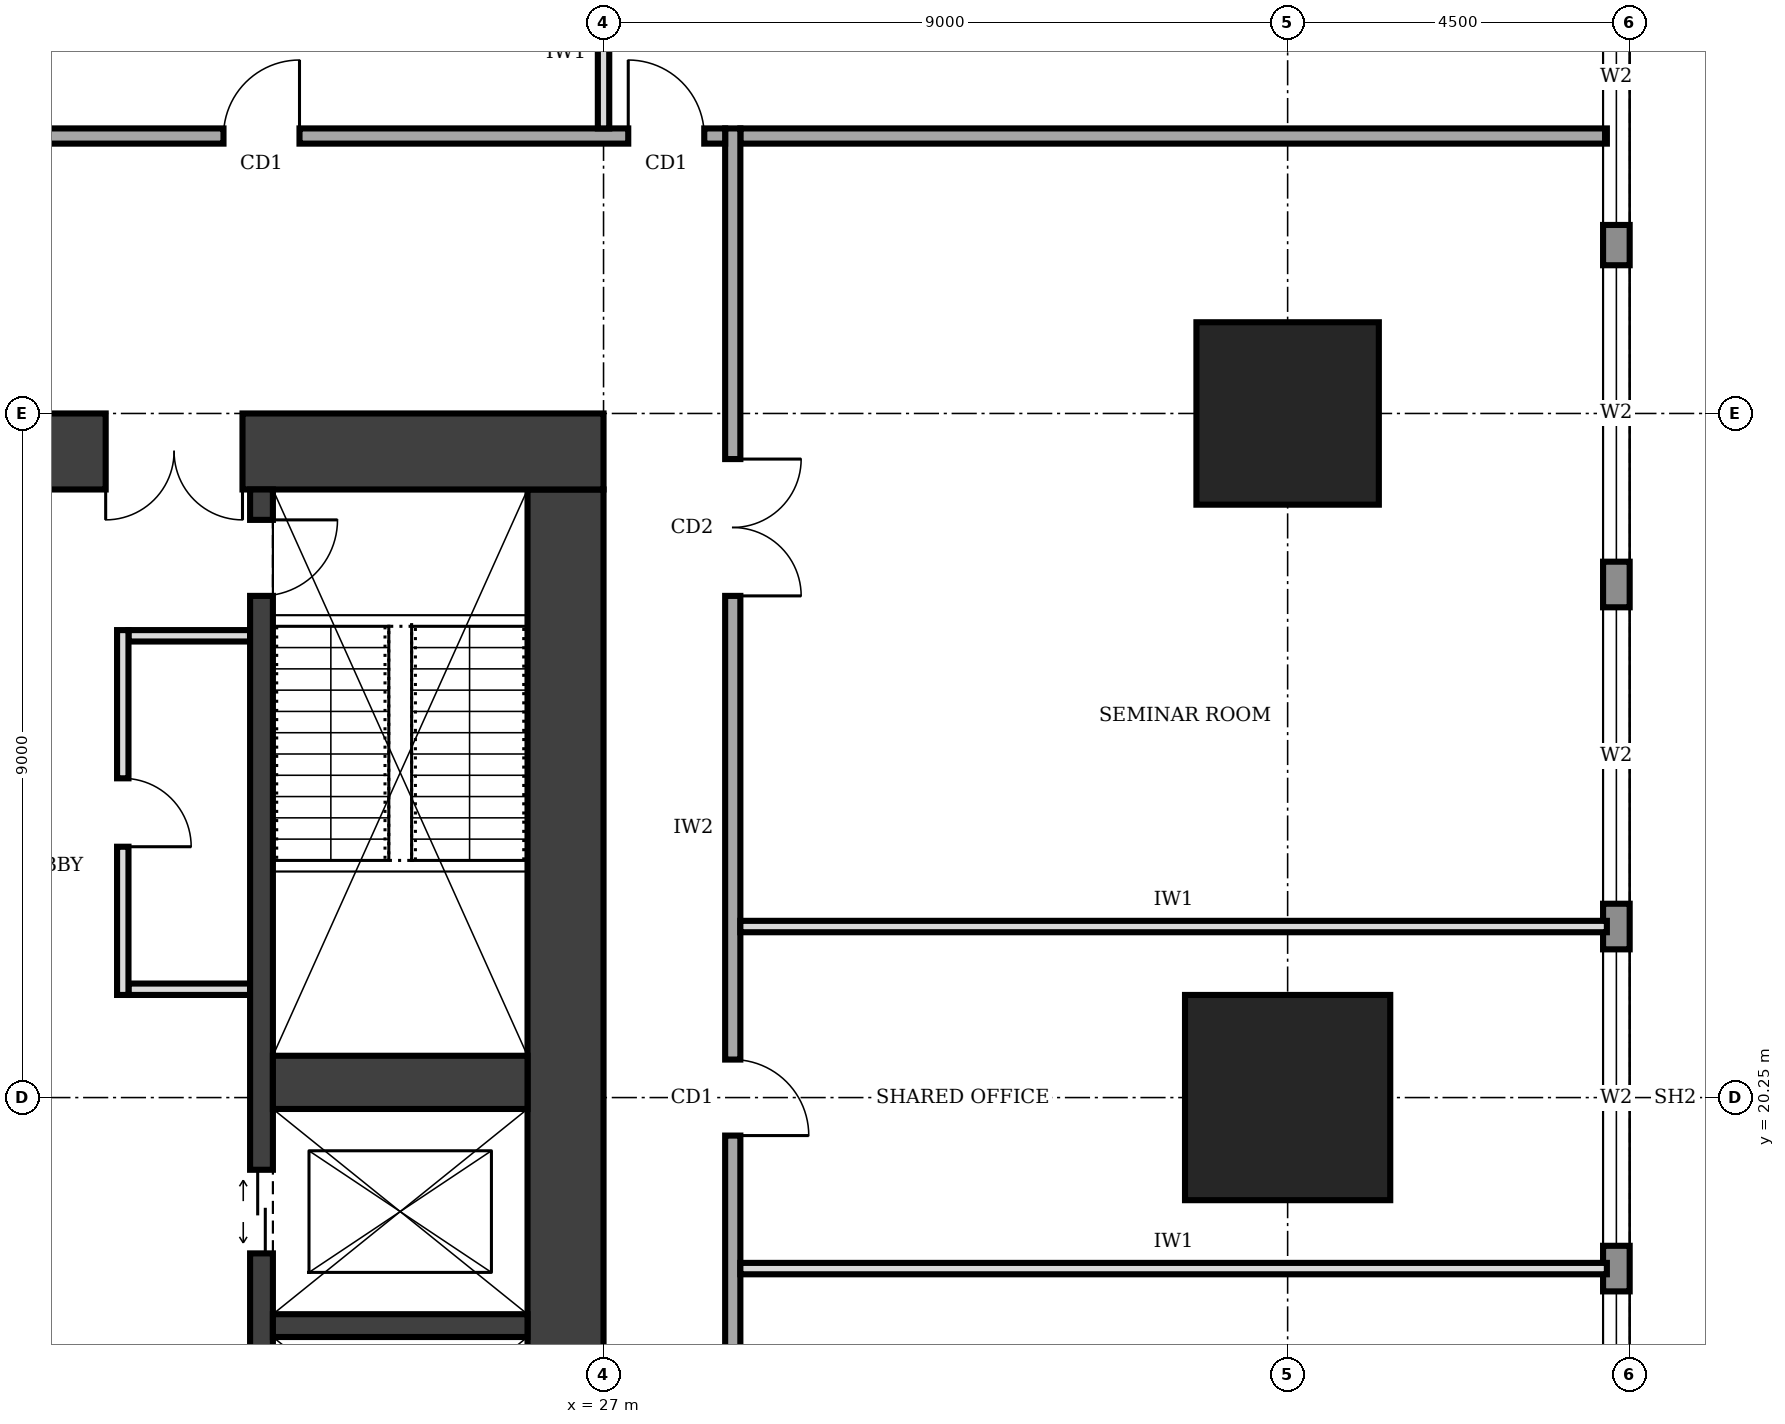
"""IFC4 building model, lengths in metres.
Left out: names, types, materials, properties, quantities, classifications, styles, units other than length and angle.
Written with IfcOpenShell. Run it as: python <this file> out.ifc"""

import sys

from ifc_helpers import new_model, si_unit, direction, frame, frame_2d, origin, origin_2d, place, context, subcontext, project, spatial, rectangle, extrude, element, fill, save


model = new_model("IFC4")
c1 = context("Model", 3, precision=1e-05, world=origin(), true_north=direction((0.0, 1.0)))
c2 = subcontext(c1, "Body", "Model", "MODEL_VIEW")
j1 = project(units=[si_unit("LENGTHUNIT", "METRE"), si_unit("PLANEANGLEUNIT", "RADIAN")], contexts=[c1])
p1 = place(None, origin())
s1 = spatial("IfcSite", under=j1, at=p1, CompositionType="ELEMENT")
p2 = place(p1, origin())
s2 = spatial("IfcBuilding", under=s1, at=p2, CompositionType="ELEMENT")
p3 = place(p2, frame((0.0, 0.0, 57.0)))
s3 = spatial("IfcBuildingStorey", under=s2, at=p3, CompositionType="ELEMENT", Elevation=57.0)
p4 = place(p3, frame((26.5, 12.25, 0.0), z_axis=(0.0, 0.0, 1.0), x_axis=(0.0, 1.0, 0.0)))
e1 = element("IfcWall", 1, at=p4, inside=s3, PredefinedType="SHEAR", context=c2, shape_type="SweptSolid", body=[
    extrude(rectangle(XDim=16.0, YDim=1.0, at=frame_2d((8.0, 0.0))), origin(), (0.0, 0.0, 1.0), 4.0),
])
p5 = place(p3, frame((27.0, 28.75, 0.0), z_axis=(0.0, 0.0, 1.0), x_axis=(-1.0, 0.0, 0.0)))
e2 = element("IfcWall", 2, at=p5, inside=s3, PredefinedType="SHEAR", context=c2, shape_type="SweptSolid", body=[
    extrude(rectangle(XDim=13.5, YDim=1.0, at=frame_2d((6.75, 0.0))), origin(), (0.0, 0.0, 1.0), 4.0),
])
p6 = place(p5, frame((4.75, 0.0, 0.0)))
e3 = element("IfcOpeningElement", 3, at=p6, cuts=e2, PredefinedType="OPENING", context=c2, shape_type="SweptSolid", body=[
    extrude(rectangle(XDim=1.8, YDim=2.1, at=frame_2d((0.9, 1.05))), frame((0.0, 0.51, 0.0), z_axis=(0.0, -1.0, 0.0), x_axis=(1.0, 0.0, 0.0)), (0.0, 0.0, 1.0), 1.02),
])
p7 = place(p3, frame((22.5, 12.25, 0.0), z_axis=(0.0, 0.0, 1.0), x_axis=(0.0, 1.0, 0.0)))
e4 = element("IfcWall", 4, at=p7, inside=s3, PredefinedType="SHEAR", context=c2, shape_type="SweptSolid", body=[
    extrude(rectangle(XDim=16.0, YDim=0.3, at=frame_2d((8.0, 0.0))), origin(), (0.0, 0.0, 1.0), 4.0),
])
p8 = place(p7, frame((14.6, 0.0, 0.0)))
e5 = element("IfcOpeningElement", 5, at=p8, cuts=e4, PredefinedType="OPENING", context=c2, shape_type="SweptSolid", body=[
    extrude(rectangle(XDim=1.0, YDim=2.1, at=frame_2d((0.5, 1.05))), frame((0.0, 0.16, 0.0), z_axis=(0.0, -1.0, 0.0), x_axis=(1.0, 0.0, 0.0)), (0.0, 0.0, 1.0), 0.32),
])
p9 = place(p7, frame((0.375, 0.0, 0.0)))
e6 = element("IfcOpeningElement", 6, at=p9, cuts=e4, PredefinedType="OPENING", context=c2, shape_type="SweptSolid", body=[
    extrude(rectangle(XDim=1.1, YDim=2.1, at=frame_2d((0.55, 1.05))), frame((0.0, 0.16, 0.0), z_axis=(0.0, -1.0, 0.0), x_axis=(1.0, 0.0, 0.0)), (0.0, 0.0, 1.0), 0.32),
])
p10 = place(p7, frame((5.95, 0.0, 0.0)))
e7 = element("IfcOpeningElement", 7, at=p10, cuts=e4, PredefinedType="OPENING", context=c2, shape_type="SweptSolid", body=[
    extrude(rectangle(XDim=1.1, YDim=2.1, at=frame_2d((0.55, 1.05))), frame((0.0, 0.16, 0.0), z_axis=(0.0, -1.0, 0.0), x_axis=(1.0, 0.0, 0.0)), (0.0, 0.0, 1.0), 0.32),
])
p11 = place(p3, frame((22.65, 17.25, 0.0), z_axis=(0.0, 0.0, 1.0), x_axis=(1.0, 0.0, 0.0)))
e8 = element("IfcWall", 8, at=p11, inside=s3, PredefinedType="SHEAR", context=c2, shape_type="SweptSolid", body=[
    extrude(rectangle(XDim=3.35, YDim=0.3, at=frame_2d((1.675, 0.0))), origin(), (0.0, 0.0, 1.0), 4.0),
])
p12 = place(p3, frame((22.65, 20.45, 0.0), z_axis=(0.0, 0.0, 1.0), x_axis=(1.0, 0.0, 0.0)))
e9 = element("IfcWall", 9, at=p12, inside=s3, PredefinedType="SHEAR", context=c2, shape_type="SweptSolid", body=[
    extrude(rectangle(XDim=3.35, YDim=0.7, at=frame_2d((1.675, 0.0))), origin(), (0.0, 0.0, 1.0), 4.0),
])
p13 = place(p3, frame((36.0, 20.25, 0.0), z_axis=(0.0, 0.0, 1.0), x_axis=(1.0, 0.0, 0.0)))
e10 = element("IfcColumn", 10, at=p13, inside=s3, PredefinedType="COLUMN", context=c2, shape_type="SweptSolid", body=[
    extrude(rectangle(XDim=2.7, YDim=2.7, at=origin_2d()), origin(), (0.0, 0.0, 1.0), 4.0),
])
p14 = place(p3, frame((36.0, 29.25, 0.0), z_axis=(0.0, 0.0, 1.0), x_axis=(1.0, 0.0, 0.0)))
e11 = element("IfcColumn", 11, at=p14, inside=s3, PredefinedType="COLUMN", context=c2, shape_type="SweptSolid", body=[
    extrude(rectangle(XDim=2.4, YDim=2.4, at=origin_2d()), origin(), (0.0, 0.0, 1.0), 4.0),
])
p15 = place(p3, frame((40.325, 4.52, 0.0), z_axis=(0.0, 0.0, 1.0), x_axis=(0.0, 1.0, 0.0)))
e12 = element("IfcWall", 12, at=p15, inside=s3, PredefinedType="STANDARD", context=c2, shape_type="SweptSolid", body=[
    extrude(rectangle(XDim=31.46, YDim=0.35, at=frame_2d((15.73, 0.0))), origin(), (0.0, 0.0, 1.0), 3.75),
])
p16 = place(p15, frame((4.78, 0.0, 0.6)))
e13 = element("IfcOpeningElement", 13, at=p16, cuts=e12, PredefinedType="OPENING", context=c2, shape_type="SweptSolid", body=[
    extrude(rectangle(XDim=3.9, YDim=2.6, at=frame_2d((1.95, 1.3))), frame((0.0, 0.185, 0.0), z_axis=(0.0, -1.0, 0.0), x_axis=(1.0, 0.0, 0.0)), (0.0, 0.0, 1.0), 0.37),
])
p17 = place(p15, frame((9.28, 0.0, 0.6)))
e14 = element("IfcOpeningElement", 14, at=p17, cuts=e12, PredefinedType="OPENING", context=c2, shape_type="SweptSolid", body=[
    extrude(rectangle(XDim=3.9, YDim=2.6, at=frame_2d((1.95, 1.3))), frame((0.0, 0.185, 0.0), z_axis=(0.0, -1.0, 0.0), x_axis=(1.0, 0.0, 0.0)), (0.0, 0.0, 1.0), 0.37),
])
p18 = place(p15, frame((13.78, 0.0, 0.6)))
e15 = element("IfcOpeningElement", 15, at=p18, cuts=e12, PredefinedType="OPENING", context=c2, shape_type="SweptSolid", body=[
    extrude(rectangle(XDim=3.9, YDim=2.6, at=frame_2d((1.95, 1.3))), frame((0.0, 0.185, 0.0), z_axis=(0.0, -1.0, 0.0), x_axis=(1.0, 0.0, 0.0)), (0.0, 0.0, 1.0), 0.37),
])
p19 = place(p15, frame((18.28, 0.0, 0.6)))
e16 = element("IfcOpeningElement", 16, at=p19, cuts=e12, PredefinedType="OPENING", context=c2, shape_type="SweptSolid", body=[
    extrude(rectangle(XDim=3.9, YDim=2.6, at=frame_2d((1.95, 1.3))), frame((0.0, 0.185, 0.0), z_axis=(0.0, -1.0, 0.0), x_axis=(1.0, 0.0, 0.0)), (0.0, 0.0, 1.0), 0.37),
])
p20 = place(p15, frame((22.78, 0.0, 0.6)))
e17 = element("IfcOpeningElement", 17, at=p20, cuts=e12, PredefinedType="OPENING", context=c2, shape_type="SweptSolid", body=[
    extrude(rectangle(XDim=3.9, YDim=2.6, at=frame_2d((1.95, 1.3))), frame((0.0, 0.185, 0.0), z_axis=(0.0, -1.0, 0.0), x_axis=(1.0, 0.0, 0.0)), (0.0, 0.0, 1.0), 0.37),
])
p21 = place(p15, frame((27.21, 0.0, 0.6)))
e18 = element("IfcOpeningElement", 18, at=p21, cuts=e12, PredefinedType="OPENING", context=c2, shape_type="SweptSolid", body=[
    extrude(rectangle(XDim=3.9, YDim=2.6, at=frame_2d((1.95, 1.3))), frame((0.0, 0.185, 0.0), z_axis=(0.0, -1.0, 0.0), x_axis=(1.0, 0.0, 0.0)), (0.0, 0.0, 1.0), 0.37),
])
p22 = place(p3, frame((20.675, 21.6, 0.0), z_axis=(0.0, 0.0, 1.0), x_axis=(0.0, 1.0, 0.0)))
e19 = element("IfcWall", 19, at=p22, inside=s3, PredefinedType="PARTITIONING", context=c2, shape_type="SweptSolid", body=[
    extrude(rectangle(XDim=4.8, YDim=0.15, at=frame_2d((2.4, 0.0))), origin(), (0.0, 0.0, 1.0), 3.75),
])
p23 = place(p22, frame((1.95, 0.0, 0.0)))
e20 = element("IfcOpeningElement", 20, at=p23, cuts=e19, PredefinedType="OPENING", context=c2, shape_type="SweptSolid", body=[
    extrude(rectangle(XDim=0.9, YDim=2.1, at=frame_2d((0.45, 1.05))), frame((0.0, 0.085, 0.0), z_axis=(0.0, -1.0, 0.0), x_axis=(1.0, 0.0, 0.0)), (0.0, 0.0, 1.0), 0.17),
])
for number, where, z_axis, x_axis in (
    (21, (20.75, 21.675, 0.0), (0.0, 0.0, 1.0), (1.0, 0.0, 0.0)),
    (22, (20.75, 26.325, 0.0), (0.0, 0.0, 1.0), (1.0, 0.0, 0.0)),
):
    element("IfcWall", number, at=place(p3, frame(where, z_axis=z_axis, x_axis=x_axis)), inside=s3, PredefinedType="PARTITIONING", context=c2, shape_type="SweptSolid", body=[
        extrude(rectangle(XDim=1.6, YDim=0.15, at=frame_2d((0.8, 0.0))), origin(), (0.0, 0.0, 1.0), 3.75),
    ])
p24 = place(p3, frame((28.7, 9.2, 0.0), z_axis=(0.0, 0.0, 1.0), x_axis=(0.0, 1.0, 0.0)))
e23 = element("IfcWall", 23, at=p24, inside=s3, PredefinedType="SOLIDWALL", context=c2, shape_type="SweptSolid", body=[
    extrude(rectangle(XDim=23.8, YDim=0.2, at=frame_2d((11.9, 0.0))), origin(), (0.0, 0.0, 1.0), 3.75),
])
p25 = place(p24, frame((3.4, 0.0, 0.0)))
e24 = element("IfcOpeningElement", 24, at=p25, cuts=e23, PredefinedType="OPENING", context=c2, shape_type="SweptSolid", body=[
    extrude(rectangle(XDim=1.8, YDim=2.1, at=frame_2d((0.9, 1.05))), frame((0.0, 0.11, 0.0), z_axis=(0.0, -1.0, 0.0), x_axis=(1.0, 0.0, 0.0)), (0.0, 0.0, 1.0), 0.22),
])
p26 = place(p24, frame((10.55, 0.0, 0.0)))
e25 = element("IfcOpeningElement", 25, at=p26, cuts=e23, PredefinedType="OPENING", context=c2, shape_type="SweptSolid", body=[
    extrude(rectangle(XDim=1.0, YDim=2.1, at=frame_2d((0.5, 1.05))), frame((0.0, 0.11, 0.0), z_axis=(0.0, -1.0, 0.0), x_axis=(1.0, 0.0, 0.0)), (0.0, 0.0, 1.0), 0.22),
])
p27 = place(p24, frame((17.65, 0.0, 0.0)))
e26 = element("IfcOpeningElement", 26, at=p27, cuts=e23, PredefinedType="OPENING", context=c2, shape_type="SweptSolid", body=[
    extrude(rectangle(XDim=1.8, YDim=2.1, at=frame_2d((0.9, 1.05))), frame((0.0, 0.11, 0.0), z_axis=(0.0, -1.0, 0.0), x_axis=(1.0, 0.0, 0.0)), (0.0, 0.0, 1.0), 0.22),
])
p28 = place(p3, frame((28.6, 32.9, 0.0), z_axis=(0.0, 0.0, 1.0), x_axis=(-1.0, 0.0, 0.0)))
e27 = element("IfcWall", 27, at=p28, inside=s3, PredefinedType="SOLIDWALL", context=c2, shape_type="SweptSolid", body=[
    extrude(rectangle(XDim=16.9, YDim=0.2, at=frame_2d((8.45, 0.0))), origin(), (0.0, 0.0, 1.0), 3.75),
])
p29 = place(p28, frame((15.425, 0.0, 0.0)))
e28 = element("IfcOpeningElement", 28, at=p29, cuts=e27, PredefinedType="OPENING", context=c2, shape_type="SweptSolid", body=[
    extrude(rectangle(XDim=1.0, YDim=2.1, at=frame_2d((0.5, 1.05))), frame((0.0, 0.11, 0.0), z_axis=(0.0, -1.0, 0.0), x_axis=(1.0, 0.0, 0.0)), (0.0, 0.0, 1.0), 0.22),
])
p30 = place(p28, frame((12.35, 0.0, 0.0)))
e29 = element("IfcOpeningElement", 29, at=p30, cuts=e27, PredefinedType="OPENING", context=c2, shape_type="SweptSolid", body=[
    extrude(rectangle(XDim=1.0, YDim=2.1, at=frame_2d((0.5, 1.05))), frame((0.0, 0.11, 0.0), z_axis=(0.0, -1.0, 0.0), x_axis=(1.0, 0.0, 0.0)), (0.0, 0.0, 1.0), 0.22),
])
p31 = place(p28, frame((5.6, 0.0, 0.0)))
e30 = element("IfcOpeningElement", 30, at=p31, cuts=e27, PredefinedType="OPENING", context=c2, shape_type="SweptSolid", body=[
    extrude(rectangle(XDim=1.0, YDim=2.1, at=frame_2d((0.5, 1.05))), frame((0.0, 0.11, 0.0), z_axis=(0.0, -1.0, 0.0), x_axis=(1.0, 0.0, 0.0)), (0.0, 0.0, 1.0), 0.22),
])
p32 = place(p28, frame((0.275, 0.0, 0.0)))
e31 = element("IfcOpeningElement", 31, at=p32, cuts=e27, PredefinedType="OPENING", context=c2, shape_type="SweptSolid", body=[
    extrude(rectangle(XDim=1.0, YDim=2.1, at=frame_2d((0.5, 1.05))), frame((0.0, 0.11, 0.0), z_axis=(0.0, -1.0, 0.0), x_axis=(1.0, 0.0, 0.0)), (0.0, 0.0, 1.0), 0.22),
])
p33 = place(p3, frame((28.8, 32.9, 0.0), z_axis=(0.0, 0.0, 1.0), x_axis=(1.0, 0.0, 0.0)))
e32 = element("IfcWall", 32, at=p33, inside=s3, PredefinedType="SOLIDWALL", context=c2, shape_type="SweptSolid", body=[
    extrude(rectangle(XDim=11.4, YDim=0.2, at=frame_2d((5.7, 0.0))), origin(), (0.0, 0.0, 1.0), 3.75),
])
p34 = place(p3, frame((27.0, 33.0, 0.0), z_axis=(0.0, 0.0, 1.0), x_axis=(0.0, 1.0, 0.0)))
e33 = element("IfcWall", 33, at=p34, inside=s3, PredefinedType="PARTITIONING", context=c2, shape_type="SweptSolid", body=[
    extrude(rectangle(XDim=1.98, YDim=0.15, at=frame_2d((0.99, 0.0))), origin(), (0.0, 0.0, 1.0), 2.85),
])
for number, where, z_axis, x_axis in (
    (34, (28.8, 18.0, 0.0), (0.0, 0.0, 1.0), (1.0, 0.0, 0.0)),
    (35, (28.8, 22.5, 0.0), (0.0, 0.0, 1.0), (1.0, 0.0, 0.0)),
):
    element("IfcWall", number, at=place(p3, frame(where, z_axis=z_axis, x_axis=x_axis)), inside=s3, PredefinedType="PARTITIONING", context=c2, shape_type="SweptSolid", body=[
        extrude(rectangle(XDim=11.4, YDim=0.15, at=frame_2d((5.7, 0.0))), origin(), (0.0, 0.0, 1.0), 3.75),
    ])
p35 = place(p17, origin())
e36 = element("IfcWindow", 36, at=p35, inside=s3, PartitioningType="SINGLE_PANEL", PredefinedType="WINDOW", context=c2, shape_type="SweptSolid", body=[
    extrude(rectangle(XDim=3.9, YDim=2.6, at=frame_2d((1.95, 1.3))), frame((0.0, 0.03, 0.0), z_axis=(0.0, -1.0, 0.0), x_axis=(1.0, 0.0, 0.0)), (0.0, 0.0, 1.0), 0.06),
])
fill(e14, e36)
p36 = place(p18, origin())
e37 = element("IfcWindow", 37, at=p36, inside=s3, PartitioningType="SINGLE_PANEL", PredefinedType="WINDOW", context=c2, shape_type="SweptSolid", body=[
    extrude(rectangle(XDim=3.9, YDim=2.6, at=frame_2d((1.95, 1.3))), frame((0.0, 0.03, 0.0), z_axis=(0.0, -1.0, 0.0), x_axis=(1.0, 0.0, 0.0)), (0.0, 0.0, 1.0), 0.06),
])
fill(e15, e37)
p37 = place(p19, origin())
e38 = element("IfcWindow", 38, at=p37, inside=s3, PartitioningType="SINGLE_PANEL", PredefinedType="WINDOW", context=c2, shape_type="SweptSolid", body=[
    extrude(rectangle(XDim=3.9, YDim=2.6, at=frame_2d((1.95, 1.3))), frame((0.0, 0.03, 0.0), z_axis=(0.0, -1.0, 0.0), x_axis=(1.0, 0.0, 0.0)), (0.0, 0.0, 1.0), 0.06),
])
fill(e16, e38)
p38 = place(p20, origin())
e39 = element("IfcWindow", 39, at=p38, inside=s3, PartitioningType="SINGLE_PANEL", PredefinedType="WINDOW", context=c2, shape_type="SweptSolid", body=[
    extrude(rectangle(XDim=3.9, YDim=2.6, at=frame_2d((1.95, 1.3))), frame((0.0, 0.03, 0.0), z_axis=(0.0, -1.0, 0.0), x_axis=(1.0, 0.0, 0.0)), (0.0, 0.0, 1.0), 0.06),
])
fill(e17, e39)
p39 = place(p21, origin())
e40 = element("IfcWindow", 40, at=p39, inside=s3, PartitioningType="SINGLE_PANEL", PredefinedType="WINDOW", context=c2, shape_type="SweptSolid", body=[
    extrude(rectangle(XDim=3.9, YDim=2.6, at=frame_2d((1.95, 1.3))), frame((0.0, 0.03, 0.0), z_axis=(0.0, -1.0, 0.0), x_axis=(1.0, 0.0, 0.0)), (0.0, 0.0, 1.0), 0.06),
])
fill(e18, e40)
p40 = place(p6, origin())
e41 = element("IfcDoor", 41, at=p40, inside=s3, OperationType="DOUBLE_DOOR_SINGLE_SWING", PredefinedType="DOOR", context=c2, shape_type="SweptSolid", body=[
    extrude(rectangle(XDim=1.8, YDim=2.1, at=frame_2d((0.9, 1.05))), frame((0.0, 0.025, 0.0), z_axis=(0.0, -1.0, 0.0), x_axis=(1.0, 0.0, 0.0)), (0.0, 0.0, 1.0), 0.05),
])
fill(e3, e41)
p41 = place(p8, frame((1.0, 0.0, 0.0), z_axis=(0.0, 0.0, 1.0), x_axis=(-1.0, 0.0, 0.0)))
e42 = element("IfcDoor", 42, at=p41, inside=s3, OperationType="SINGLE_SWING_LEFT", PredefinedType="DOOR", context=c2, shape_type="SweptSolid", body=[
    extrude(rectangle(XDim=1.0, YDim=2.1, at=frame_2d((0.5, 1.05))), frame((0.0, 0.025, 0.0), z_axis=(0.0, -1.0, 0.0), x_axis=(1.0, 0.0, 0.0)), (0.0, 0.0, 1.0), 0.05),
])
fill(e5, e42)
p42 = place(p10, origin())
e43 = element("IfcDoor", 43, at=p42, inside=s3, OperationType="DOUBLE_DOOR_SLIDING", PredefinedType="DOOR", context=c2, shape_type="SweptSolid", body=[
    extrude(rectangle(XDim=1.1, YDim=2.1, at=frame_2d((0.55, 1.05))), frame((0.0, 0.025, 0.0), z_axis=(0.0, -1.0, 0.0), x_axis=(1.0, 0.0, 0.0)), (0.0, 0.0, 1.0), 0.05),
])
fill(e7, e43)
p43 = place(p23, frame((0.9, 0.0, 0.0), z_axis=(0.0, 0.0, 1.0), x_axis=(-1.0, 0.0, 0.0)))
e44 = element("IfcDoor", 44, at=p43, inside=s3, OperationType="SINGLE_SWING_RIGHT", PredefinedType="DOOR", context=c2, shape_type="SweptSolid", body=[
    extrude(rectangle(XDim=0.9, YDim=2.1, at=frame_2d((0.45, 1.05))), frame((0.0, 0.025, 0.0), z_axis=(0.0, -1.0, 0.0), x_axis=(1.0, 0.0, 0.0)), (0.0, 0.0, 1.0), 0.05),
])
fill(e20, e44)
p44 = place(p26, frame((1.0, 0.0, 0.0), z_axis=(0.0, 0.0, 1.0), x_axis=(-1.0, 0.0, 0.0)))
e45 = element("IfcDoor", 45, at=p44, inside=s3, OperationType="SINGLE_SWING_RIGHT", PredefinedType="DOOR", context=c2, shape_type="SweptSolid", body=[
    extrude(rectangle(XDim=1.0, YDim=2.1, at=frame_2d((0.5, 1.05))), frame((0.0, 0.025, 0.0), z_axis=(0.0, -1.0, 0.0), x_axis=(1.0, 0.0, 0.0)), (0.0, 0.0, 1.0), 0.05),
])
fill(e25, e45)
p45 = place(p27, frame((1.8, 0.0, 0.0), z_axis=(0.0, 0.0, 1.0), x_axis=(-1.0, 0.0, 0.0)))
e46 = element("IfcDoor", 46, at=p45, inside=s3, OperationType="DOUBLE_DOOR_SINGLE_SWING", PredefinedType="DOOR", context=c2, shape_type="SweptSolid", body=[
    extrude(rectangle(XDim=1.8, YDim=2.1, at=frame_2d((0.9, 1.05))), frame((0.0, 0.025, 0.0), z_axis=(0.0, -1.0, 0.0), x_axis=(1.0, 0.0, 0.0)), (0.0, 0.0, 1.0), 0.05),
])
fill(e26, e46)
p46 = place(p31, frame((1.0, 0.0, 0.0), z_axis=(0.0, 0.0, 1.0), x_axis=(-1.0, 0.0, 0.0)))
e47 = element("IfcDoor", 47, at=p46, inside=s3, OperationType="SINGLE_SWING_RIGHT", PredefinedType="DOOR", context=c2, shape_type="SweptSolid", body=[
    extrude(rectangle(XDim=1.0, YDim=2.1, at=frame_2d((0.5, 1.05))), frame((0.0, 0.025, 0.0), z_axis=(0.0, -1.0, 0.0), x_axis=(1.0, 0.0, 0.0)), (0.0, 0.0, 1.0), 0.05),
])
fill(e30, e47)
p47 = place(p32, frame((1.0, 0.0, 0.0), z_axis=(0.0, 0.0, 1.0), x_axis=(-1.0, 0.0, 0.0)))
e48 = element("IfcDoor", 48, at=p47, inside=s3, OperationType="SINGLE_SWING_LEFT", PredefinedType="DOOR", context=c2, shape_type="SweptSolid", body=[
    extrude(rectangle(XDim=1.0, YDim=2.1, at=frame_2d((0.5, 1.05))), frame((0.0, 0.025, 0.0), z_axis=(0.0, -1.0, 0.0), x_axis=(1.0, 0.0, 0.0)), (0.0, 0.0, 1.0), 0.05),
])
fill(e31, e48)
save(model, sys.argv[1])
